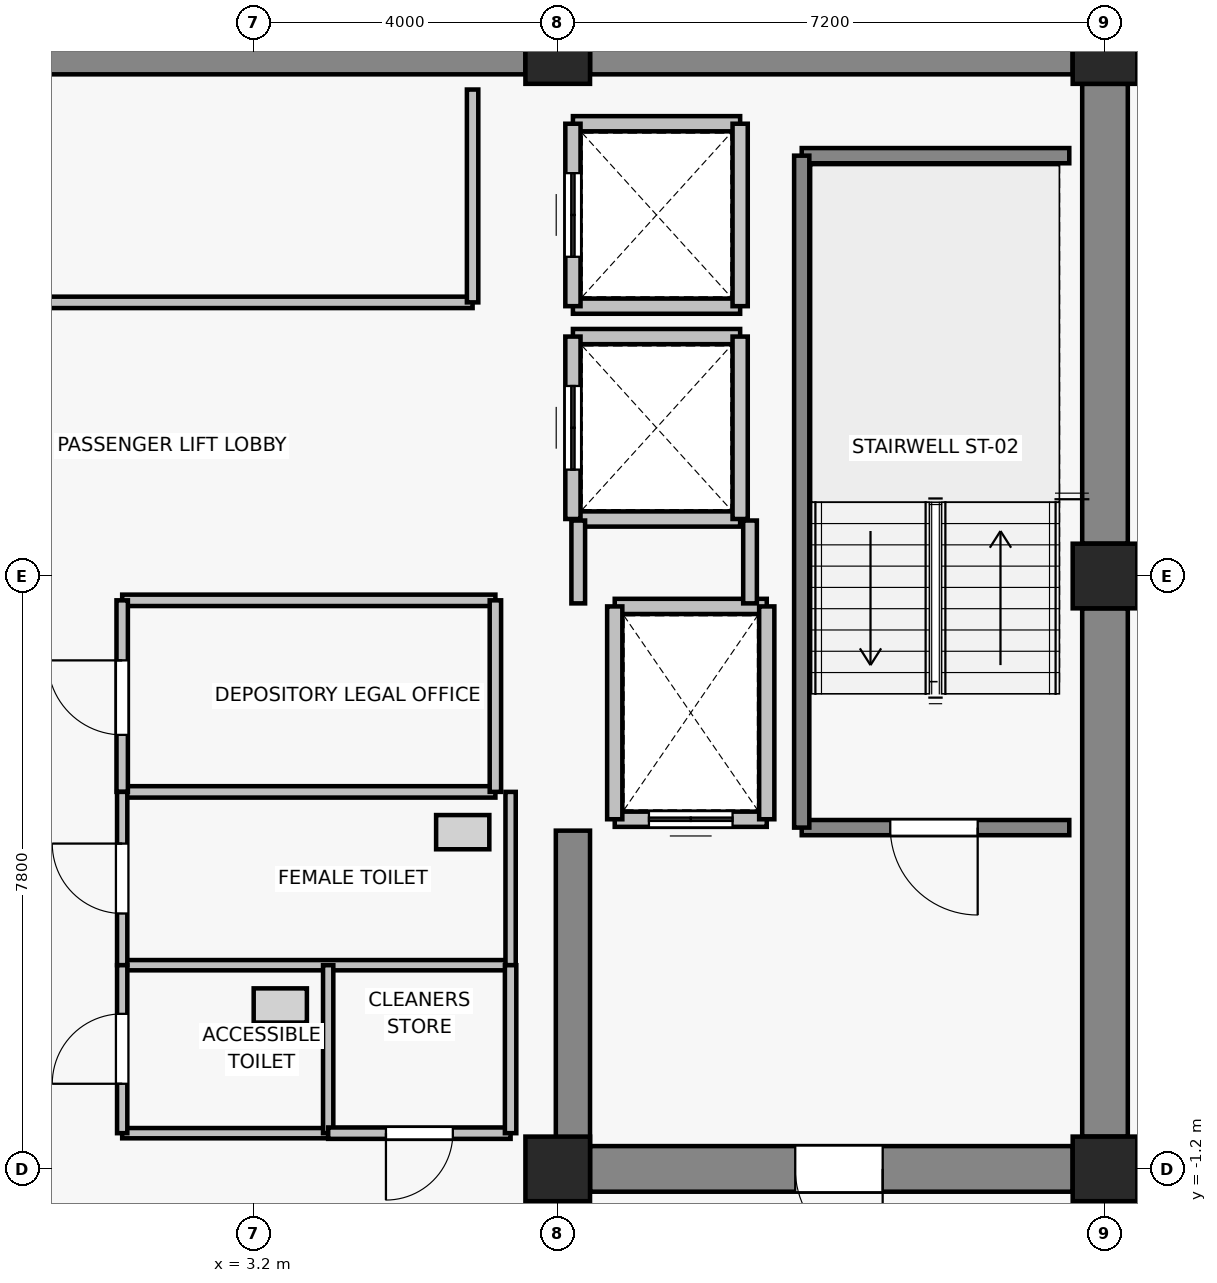
"""IFC4 building model, lengths in metres.
Left out: names, types, materials, properties, quantities, classifications, styles, units other than length and angle.
Written with IfcOpenShell. Run it as: python <this file> out.ifc"""

import sys

from ifc_helpers import new_model, si_unit, direction, frame, frame_2d, origin, origin_2d, place, context, subcontext, project, spatial, rectangle, extrude, source, transform, mapped, element, fill, save


model = new_model("IFC4")
c1 = context("Model", 3, precision=1e-05, world=origin(), true_north=direction((0.0, 1.0)))
c2 = subcontext(c1, "Body", "Model", "MODEL_VIEW")
j1 = project(units=[si_unit("LENGTHUNIT", "METRE"), si_unit("PLANEANGLEUNIT", "RADIAN")], contexts=[c1])
p1 = place(None, origin())
s1 = spatial("IfcSite", under=j1, at=p1, CompositionType="ELEMENT")
p2 = place(p1, origin())
s2 = spatial("IfcBuilding", under=s1, at=p2, CompositionType="ELEMENT")
p3 = place(p2, frame((0.0, 0.0, 268.3)))
s3 = spatial("IfcBuildingStorey", under=s2, at=p3, CompositionType="ELEMENT", Elevation=268.3)
for number, where, z_axis, x_axis in (
    (1, (7.2, -1.2, 0.0), (0.0, 0.0, 1.0), (1.0, 0.0, 0.0)),
    (2, (14.4, -1.2, 0.0), (0.0, 0.0, 1.0), (1.0, 0.0, 0.0)),
    (3, (14.4, 6.6, 0.0), (0.0, 0.0, 1.0), (1.0, 0.0, 0.0)),
    (4, (7.2, 13.5, 0.0), (0.0, 0.0, 1.0), (1.0, 0.0, 0.0)),
    (5, (14.4, 13.5, 0.0), (0.0, 0.0, 1.0), (1.0, 0.0, 0.0)),
):
    element("IfcColumn", number, at=place(p3, frame(where, z_axis=z_axis, x_axis=x_axis)), inside=s3, PredefinedType="COLUMN", context=c2, shape_type="SweptSolid", body=[
        extrude(rectangle(XDim=0.85, YDim=0.85, at=origin_2d()), origin(), (0.0, 0.0, 1.0), 3.3),
    ])
p4 = place(p3, frame((-6.775, 13.5, 0.0), z_axis=(0.0, 0.0, 1.0), x_axis=(1.0, 0.0, 0.0)))
e6 = element("IfcWall", 6, at=p4, inside=s3, PredefinedType="SHEAR", context=c2, shape_type="SweptSolid", body=[
    extrude(rectangle(XDim=13.55, YDim=0.6, at=frame_2d((6.775, 0.0))), origin(), (0.0, 0.0, 1.0), 3.08),
])
p5 = place(p3, frame((7.625, 13.5, 0.0), z_axis=(0.0, 0.0, 1.0), x_axis=(1.0, 0.0, 0.0)))
e7 = element("IfcWall", 7, at=p5, inside=s3, PredefinedType="SHEAR", context=c2, shape_type="SweptSolid", body=[
    extrude(rectangle(XDim=6.35, YDim=0.6, at=frame_2d((3.175, 0.0))), origin(), (0.0, 0.0, 1.0), 3.08),
])
p6 = place(p3, frame((14.4, -0.775, 0.0), z_axis=(0.0, 0.0, 1.0), x_axis=(0.0, 1.0, 0.0)))
e8 = element("IfcWall", 8, at=p6, inside=s3, PredefinedType="SHEAR", context=c2, shape_type="SweptSolid", body=[
    extrude(rectangle(XDim=6.95, YDim=0.6, at=frame_2d((3.475, 0.0))), origin(), (0.0, 0.0, 1.0), 3.08),
])
p7 = place(p3, frame((14.4, 7.025, 0.0), z_axis=(0.0, 0.0, 1.0), x_axis=(0.0, 1.0, 0.0)))
e9 = element("IfcWall", 9, at=p7, inside=s3, PredefinedType="SHEAR", context=c2, shape_type="SweptSolid", body=[
    extrude(rectangle(XDim=6.05, YDim=0.6, at=frame_2d((3.025, 0.0))), origin(), (0.0, 0.0, 1.0), 3.08),
])
p8 = place(p3, frame((13.975, -1.2, 0.0), z_axis=(0.0, 0.0, 1.0), x_axis=(-1.0, 0.0, 0.0)))
e10 = element("IfcWall", 10, at=p8, inside=s3, PredefinedType="SHEAR", context=c2, shape_type="SweptSolid", body=[
    extrude(rectangle(XDim=6.35, YDim=0.6, at=frame_2d((3.175, 0.0))), origin(), (0.0, 0.0, 1.0), 3.08),
])
p9 = place(p8, frame((2.5, 0.0, 0.0)))
e11 = element("IfcOpeningElement", 11, at=p9, cuts=e10, PredefinedType="OPENING", context=c2, shape_type="SweptSolid", body=[
    extrude(rectangle(XDim=1.15, YDim=2.15, at=frame_2d((0.575, 1.075))), frame((0.0, 0.31, 0.0), z_axis=(0.0, -1.0, 0.0), x_axis=(1.0, 0.0, 0.0)), (0.0, 0.0, 1.0), 0.62),
])
p10 = place(p3, frame((7.4, -0.9, 0.0), z_axis=(0.0, 0.0, 1.0), x_axis=(0.0, 1.0, 0.0)))
e12 = element("IfcWall", 12, at=p10, inside=s3, PredefinedType="SHEAR", context=c2, shape_type="SweptSolid", body=[
    extrude(rectangle(XDim=4.15, YDim=0.45, at=frame_2d((2.075, 0.0))), origin(), (0.0, 0.0, 1.0), 3.08),
])
p11 = place(p3, frame((9.95, 3.4, 0.0), z_axis=(0.0, 0.0, 1.0), x_axis=(-1.0, 0.0, 0.0)))
e13 = element("IfcWall", 13, at=p11, inside=s3, PredefinedType="SOLIDWALL", context=c2, shape_type="SweptSolid", body=[
    extrude(rectangle(XDim=2.0, YDim=0.2, at=frame_2d((1.0, 0.0))), origin(), (0.0, 0.0, 1.0), 3.08),
])
p12 = place(p11, frame((0.45, 0.0, 0.0)))
e14 = element("IfcOpeningElement", 14, at=p12, cuts=e13, PredefinedType="OPENING", context=c2, shape_type="SweptSolid", body=[
    extrude(rectangle(XDim=1.1, YDim=2.2, at=frame_2d((0.55, 1.1))), frame((0.0, 0.11, 0.0), z_axis=(0.0, -1.0, 0.0), x_axis=(1.0, 0.0, 0.0)), (0.0, 0.0, 1.0), 0.22),
])
p13 = place(p3, frame((7.95, 6.2, 0.0), z_axis=(0.0, 0.0, 1.0), x_axis=(1.0, 0.0, 0.0)))
e15 = element("IfcWall", 15, at=p13, inside=s3, PredefinedType="SOLIDWALL", context=c2, shape_type="SweptSolid", body=[
    extrude(rectangle(XDim=2.0, YDim=0.2, at=frame_2d((1.0, 0.0))), origin(), (0.0, 0.0, 1.0), 3.08),
])
for number, where, z_axis, x_axis in (
    (16, (7.95, 3.4, 0.0), (0.0, 0.0, 1.0), (0.0, 1.0, 0.0)),
    (17, (9.95, 6.2, 0.0), (0.0, 0.0, 1.0), (0.0, -1.0, 0.0)),
):
    element("IfcWall", number, at=place(p3, frame(where, z_axis=z_axis, x_axis=x_axis)), inside=s3, PredefinedType="SOLIDWALL", context=c2, shape_type="SweptSolid", body=[
        extrude(rectangle(XDim=2.8, YDim=0.2, at=frame_2d((1.4, 0.0))), origin(), (0.0, 0.0, 1.0), 3.08),
    ])
for number, where, z_axis, x_axis in (
    (18, (9.6, 7.35, 0.0), (0.0, 0.0, 1.0), (-1.0, 0.0, 0.0)),
    (19, (7.4, 9.75, 0.0), (0.0, 0.0, 1.0), (1.0, 0.0, 0.0)),
):
    element("IfcWall", number, at=place(p3, frame(where, z_axis=z_axis, x_axis=x_axis)), inside=s3, PredefinedType="SOLIDWALL", context=c2, shape_type="SweptSolid", body=[
        extrude(rectangle(XDim=2.2, YDim=0.2, at=frame_2d((1.1, 0.0))), origin(), (0.0, 0.0, 1.0), 2.47),
    ])
p14 = place(p3, frame((7.4, 7.35, 0.0), z_axis=(0.0, 0.0, 1.0), x_axis=(0.0, 1.0, 0.0)))
e20 = element("IfcWall", 20, at=p14, inside=s3, PredefinedType="SOLIDWALL", context=c2, shape_type="SweptSolid", body=[
    extrude(rectangle(XDim=2.4, YDim=0.2, at=frame_2d((1.2, 0.0))), origin(), (0.0, 0.0, 1.0), 2.47),
])
p15 = place(p14, frame((0.65, 0.0, 0.0)))
e21 = element("IfcOpeningElement", 21, at=p15, cuts=e20, PredefinedType="OPENING", context=c2, shape_type="SweptSolid", body=[
    extrude(rectangle(XDim=1.1, YDim=2.2, at=frame_2d((0.55, 1.1))), frame((0.0, 0.11, 0.0), z_axis=(0.0, -1.0, 0.0), x_axis=(1.0, 0.0, 0.0)), (0.0, 0.0, 1.0), 0.22),
])
p16 = place(p3, frame((9.6, 9.75, 0.0), z_axis=(0.0, 0.0, 1.0), x_axis=(0.0, -1.0, 0.0)))
e22 = element("IfcWall", 22, at=p16, inside=s3, PredefinedType="SOLIDWALL", context=c2, shape_type="SweptSolid", body=[
    extrude(rectangle(XDim=2.4, YDim=0.2, at=frame_2d((1.2, 0.0))), origin(), (0.0, 0.0, 1.0), 3.08),
])
for number, where, z_axis, x_axis in (
    (23, (9.6, 10.15, 0.0), (0.0, 0.0, 1.0), (-1.0, 0.0, 0.0)),
    (24, (7.4, 12.55, 0.0), (0.0, 0.0, 1.0), (1.0, 0.0, 0.0)),
):
    element("IfcWall", number, at=place(p3, frame(where, z_axis=z_axis, x_axis=x_axis)), inside=s3, PredefinedType="SOLIDWALL", context=c2, shape_type="SweptSolid", body=[
        extrude(rectangle(XDim=2.2, YDim=0.2, at=frame_2d((1.1, 0.0))), origin(), (0.0, 0.0, 1.0), 2.47),
    ])
p17 = place(p3, frame((7.4, 10.15, 0.0), z_axis=(0.0, 0.0, 1.0), x_axis=(0.0, 1.0, 0.0)))
e25 = element("IfcWall", 25, at=p17, inside=s3, PredefinedType="SOLIDWALL", context=c2, shape_type="SweptSolid", body=[
    extrude(rectangle(XDim=2.4, YDim=0.2, at=frame_2d((1.2, 0.0))), origin(), (0.0, 0.0, 1.0), 2.47),
])
p18 = place(p17, frame((0.65, 0.0, 0.0)))
e26 = element("IfcOpeningElement", 26, at=p18, cuts=e25, PredefinedType="OPENING", context=c2, shape_type="SweptSolid", body=[
    extrude(rectangle(XDim=1.1, YDim=2.2, at=frame_2d((0.55, 1.1))), frame((0.0, 0.11, 0.0), z_axis=(0.0, -1.0, 0.0), x_axis=(1.0, 0.0, 0.0)), (0.0, 0.0, 1.0), 0.22),
])
p19 = place(p3, frame((9.6, 12.55, 0.0), z_axis=(0.0, 0.0, 1.0), x_axis=(0.0, -1.0, 0.0)))
e27 = element("IfcWall", 27, at=p19, inside=s3, PredefinedType="SOLIDWALL", context=c2, shape_type="SweptSolid", body=[
    extrude(rectangle(XDim=2.4, YDim=0.2, at=frame_2d((1.2, 0.0))), origin(), (0.0, 0.0, 1.0), 3.08),
])
p20 = place(p3, frame((13.93, 3.29, 0.0), z_axis=(0.0, 0.0, 1.0), x_axis=(-1.0, 0.0, 0.0)))
e28 = element("IfcWall", 28, at=p20, inside=s3, PredefinedType="SOLIDWALL", context=c2, shape_type="SweptSolid", body=[
    extrude(rectangle(XDim=3.52, YDim=0.2, at=frame_2d((1.76, 0.0))), origin(), (0.0, 0.0, 1.0), 3.08),
])
p21 = place(p20, frame((1.205, 0.0, 0.0)))
e29 = element("IfcOpeningElement", 29, at=p21, cuts=e28, PredefinedType="OPENING", context=c2, shape_type="SweptSolid", body=[
    extrude(rectangle(XDim=1.15, YDim=2.15, at=frame_2d((0.575, 1.075))), frame((0.0, 0.11, 0.0), z_axis=(0.0, -1.0, 0.0), x_axis=(1.0, 0.0, 0.0)), (0.0, 0.0, 1.0), 0.22),
])
p22 = place(p3, frame((10.41, 12.13, 0.0), z_axis=(0.0, 0.0, 1.0), x_axis=(1.0, 0.0, 0.0)))
e30 = element("IfcWall", 30, at=p22, inside=s3, PredefinedType="SOLIDWALL", context=c2, shape_type="SweptSolid", body=[
    extrude(rectangle(XDim=3.52, YDim=0.2, at=frame_2d((1.76, 0.0))), origin(), (0.0, 0.0, 1.0), 3.08),
])
p23 = place(p3, frame((10.41, 3.29, 0.0), z_axis=(0.0, 0.0, 1.0), x_axis=(0.0, 1.0, 0.0)))
e31 = element("IfcWall", 31, at=p23, inside=s3, PredefinedType="SOLIDWALL", context=c2, shape_type="SweptSolid", body=[
    extrude(rectangle(XDim=8.84, YDim=0.2, at=frame_2d((4.42, 0.0))), origin(), (0.0, 0.0, 1.0), 3.08),
])
p24 = place(p3, frame((7.47, 6.24, 0.0), z_axis=(0.0, 0.0, 1.0), x_axis=(0.0, 1.0, 0.0)))
e32 = element("IfcWall", 32, at=p24, inside=s3, PredefinedType="PARTITIONING", context=c2, shape_type="SweptSolid", body=[
    extrude(rectangle(XDim=1.09, YDim=0.18, at=frame_2d((0.545, 0.0))), origin(), (0.0, 0.0, 1.0), 2.47),
])
p25 = place(p3, frame((9.73, 7.33, 0.0), z_axis=(0.0, 0.0, 1.0), x_axis=(0.0, -1.0, 0.0)))
e33 = element("IfcWall", 33, at=p25, inside=s3, PredefinedType="PARTITIONING", context=c2, shape_type="SweptSolid", body=[
    extrude(rectangle(XDim=1.09, YDim=0.18, at=frame_2d((0.545, 0.0))), origin(), (0.0, 0.0, 1.0), 3.08),
])
p26 = place(p3, frame((6.08, 10.2, 0.0), z_axis=(0.0, 0.0, 1.0), x_axis=(-1.0, 0.0, 0.0)))
e34 = element("IfcWall", 34, at=p26, inside=s3, PredefinedType="PARTITIONING", context=c2, shape_type="SweptSolid", body=[
    extrude(rectangle(XDim=12.16, YDim=0.15, at=frame_2d((6.08, 0.0))), origin(), (0.0, 0.0, 1.0), 3.08),
])
p27 = place(p26, frame((7.005, 0.0, 0.0)))
e35 = element("IfcOpeningElement", 35, at=p27, cuts=e34, PredefinedType="OPENING", context=c2, shape_type="SweptSolid", body=[
    extrude(rectangle(XDim=1.15, YDim=2.15, at=frame_2d((0.575, 1.075))), frame((0.0, 0.085, 0.0), z_axis=(0.0, -1.0, 0.0), x_axis=(1.0, 0.0, 0.0)), (0.0, 0.0, 1.0), 0.17),
])
p28 = place(p3, frame((6.08, 13.0, 0.0), z_axis=(0.0, 0.0, 1.0), x_axis=(0.0, -1.0, 0.0)))
e36 = element("IfcWall", 36, at=p28, inside=s3, PredefinedType="PARTITIONING", context=c2, shape_type="SweptSolid", body=[
    extrude(rectangle(XDim=2.8, YDim=0.15, at=frame_2d((1.4, 0.0))), origin(), (0.0, 0.0, 1.0), 3.08),
])
for number, where, z_axis, x_axis in (
    (37, (6.38, 3.76, 0.0), (0.0, 0.0, 1.0), (-1.0, 0.0, 0.0)),
    (38, (1.47, 6.28, 0.0), (0.0, 0.0, 1.0), (1.0, 0.0, 0.0)),
):
    element("IfcWall", number, at=place(p3, frame(where, z_axis=z_axis, x_axis=x_axis)), inside=s3, PredefinedType="PARTITIONING", context=c2, shape_type="SweptSolid", body=[
        extrude(rectangle(XDim=4.91, YDim=0.15, at=frame_2d((2.455, 0.0))), origin(), (0.0, 0.0, 1.0), 3.08),
    ])
p29 = place(p3, frame((1.47, 3.76, 0.0), z_axis=(0.0, 0.0, 1.0), x_axis=(0.0, 1.0, 0.0)))
e39 = element("IfcWall", 39, at=p29, inside=s3, PredefinedType="PARTITIONING", context=c2, shape_type="SweptSolid", body=[
    extrude(rectangle(XDim=2.52, YDim=0.15, at=frame_2d((1.26, 0.0))), origin(), (0.0, 0.0, 1.0), 3.08),
])
p30 = place(p29, frame((0.75, 0.0, 0.0)))
e40 = element("IfcOpeningElement", 40, at=p30, cuts=e39, PredefinedType="OPENING", context=c2, shape_type="SweptSolid", body=[
    extrude(rectangle(XDim=0.98, YDim=2.15, at=frame_2d((0.49, 1.075))), frame((0.0, 0.085, 0.0), z_axis=(0.0, -1.0, 0.0), x_axis=(1.0, 0.0, 0.0)), (0.0, 0.0, 1.0), 0.17),
])
p31 = place(p3, frame((6.38, 6.28, 0.0), z_axis=(0.0, 0.0, 1.0), x_axis=(0.0, -1.0, 0.0)))
e41 = element("IfcWall", 41, at=p31, inside=s3, PredefinedType="PARTITIONING", context=c2, shape_type="SweptSolid", body=[
    extrude(rectangle(XDim=2.52, YDim=0.15, at=frame_2d((1.26, 0.0))), origin(), (0.0, 0.0, 1.0), 3.08),
])
p32 = place(p3, frame((6.58, 1.48, 0.0), z_axis=(0.0, 0.0, 1.0), x_axis=(-1.0, 0.0, 0.0)))
e42 = element("IfcWall", 42, at=p32, inside=s3, PredefinedType="PARTITIONING", context=c2, shape_type="SweptSolid", body=[
    extrude(rectangle(XDim=5.11, YDim=0.135, at=frame_2d((2.555, 0.0))), origin(), (0.0, 0.0, 1.0), 3.08),
])
p33 = place(p3, frame((1.47, 1.48, 0.0), z_axis=(0.0, 0.0, 1.0), x_axis=(0.0, 1.0, 0.0)))
e43 = element("IfcWall", 43, at=p33, inside=s3, PredefinedType="PARTITIONING", context=c2, shape_type="SweptSolid", body=[
    extrude(rectangle(XDim=2.28, YDim=0.135, at=frame_2d((1.14, 0.0))), origin(), (0.0, 0.0, 1.0), 3.08),
])
p34 = place(p33, frame((0.68, 0.0, 0.0)))
e44 = element("IfcOpeningElement", 44, at=p34, cuts=e43, PredefinedType="OPENING", context=c2, shape_type="SweptSolid", body=[
    extrude(rectangle(XDim=0.92, YDim=2.1, at=frame_2d((0.46, 1.05))), frame((0.0, 0.077, 0.0), z_axis=(0.0, -1.0, 0.0), x_axis=(1.0, 0.0, 0.0)), (0.0, 0.0, 1.0), 0.155),
])
p35 = place(p3, frame((6.58, 3.76, 0.0), z_axis=(0.0, 0.0, 1.0), x_axis=(0.0, -1.0, 0.0)))
e45 = element("IfcWall", 45, at=p35, inside=s3, PredefinedType="PARTITIONING", context=c2, shape_type="SweptSolid", body=[
    extrude(rectangle(XDim=2.28, YDim=0.135, at=frame_2d((1.14, 0.0))), origin(), (0.0, 0.0, 1.0), 3.08),
])
p36 = place(p3, frame((4.18, -0.73, 0.0), z_axis=(0.0, 0.0, 1.0), x_axis=(-1.0, 0.0, 0.0)))
e46 = element("IfcWall", 46, at=p36, inside=s3, PredefinedType="PARTITIONING", context=c2, shape_type="SweptSolid", body=[
    extrude(rectangle(XDim=2.71, YDim=0.135, at=frame_2d((1.355, 0.0))), origin(), (0.0, 0.0, 1.0), 3.08),
])
p37 = place(p3, frame((1.47, -0.73, 0.0), z_axis=(0.0, 0.0, 1.0), x_axis=(0.0, 1.0, 0.0)))
e47 = element("IfcWall", 47, at=p37, inside=s3, PredefinedType="PARTITIONING", context=c2, shape_type="SweptSolid", body=[
    extrude(rectangle(XDim=2.21, YDim=0.135, at=frame_2d((1.105, 0.0))), origin(), (0.0, 0.0, 1.0), 3.08),
])
p38 = place(p37, frame((0.65, 0.0, 0.0)))
e48 = element("IfcOpeningElement", 48, at=p38, cuts=e47, PredefinedType="OPENING", context=c2, shape_type="SweptSolid", body=[
    extrude(rectangle(XDim=0.92, YDim=2.1, at=frame_2d((0.46, 1.05))), frame((0.0, 0.077, 0.0), z_axis=(0.0, -1.0, 0.0), x_axis=(1.0, 0.0, 0.0)), (0.0, 0.0, 1.0), 0.155),
])
p39 = place(p3, frame((4.18, 1.48, 0.0), z_axis=(0.0, 0.0, 1.0), x_axis=(0.0, -1.0, 0.0)))
e49 = element("IfcWall", 49, at=p39, inside=s3, PredefinedType="PARTITIONING", context=c2, shape_type="SweptSolid", body=[
    extrude(rectangle(XDim=2.21, YDim=0.135, at=frame_2d((1.105, 0.0))), origin(), (0.0, 0.0, 1.0), 3.08),
])
p40 = place(p3, frame((6.58, -0.73, 0.0), z_axis=(0.0, 0.0, 1.0), x_axis=(-1.0, 0.0, 0.0)))
e50 = element("IfcWall", 50, at=p40, inside=s3, PredefinedType="PARTITIONING", context=c2, shape_type="SweptSolid", body=[
    extrude(rectangle(XDim=2.4, YDim=0.15, at=frame_2d((1.2, 0.0))), origin(), (0.0, 0.0, 1.0), 3.08),
])
p41 = place(p40, frame((0.76, 0.0, 0.0)))
e51 = element("IfcOpeningElement", 51, at=p41, cuts=e50, PredefinedType="OPENING", context=c2, shape_type="SweptSolid", body=[
    extrude(rectangle(XDim=0.88, YDim=2.1, at=frame_2d((0.44, 1.05))), frame((0.0, 0.085, 0.0), z_axis=(0.0, -1.0, 0.0), x_axis=(1.0, 0.0, 0.0)), (0.0, 0.0, 1.0), 0.17),
])
p42 = place(p3, frame((6.58, 1.48, 0.0), z_axis=(0.0, 0.0, 1.0), x_axis=(0.0, -1.0, 0.0)))
e52 = element("IfcWall", 52, at=p42, inside=s3, PredefinedType="PARTITIONING", context=c2, shape_type="SweptSolid", body=[
    extrude(rectangle(XDim=2.21, YDim=0.15, at=frame_2d((1.105, 0.0))), origin(), (0.0, 0.0, 1.0), 3.08),
])
m1 = source(origin(), c2, "Body", "SweptSolid", [
    extrude(rectangle(XDim=1.1, YDim=2.2, at=frame_2d((0.55, 1.1))), frame((0.0, 0.025, 0.0), z_axis=(0.0, -1.0, 0.0), x_axis=(1.0, 0.0, 0.0)), (0.0, 0.0, 1.0), 0.05),
])
p43 = place(p12, origin())
e53 = element("IfcDoor", 53, at=p43, inside=s3, OperationType="DOUBLE_DOOR_SLIDING", PredefinedType="DOOR", context=c2, shape_type="MappedRepresentation", body=[
    mapped(m1, transform((0.0, 0.0, 0.0), x_axis=(1.0, 0.0, 0.0), y_axis=(0.0, 1.0, 0.0), z_axis=(0.0, 0.0, 1.0), scale=1.0)),
])
fill(e14, e53)
p44 = place(p15, origin())
e54 = element("IfcDoor", 54, at=p44, inside=s3, OperationType="DOUBLE_DOOR_SLIDING", PredefinedType="DOOR", context=c2, shape_type="MappedRepresentation", body=[
    mapped(m1, transform((0.0, 0.0, 0.0), x_axis=(1.0, 0.0, 0.0), y_axis=(0.0, 1.0, 0.0), z_axis=(0.0, 0.0, 1.0), scale=1.0)),
])
fill(e21, e54)
p45 = place(p18, origin())
e55 = element("IfcDoor", 55, at=p45, inside=s3, OperationType="DOUBLE_DOOR_SLIDING", PredefinedType="DOOR", context=c2, shape_type="MappedRepresentation", body=[
    mapped(m1, transform((0.0, 0.0, 0.0), x_axis=(1.0, 0.0, 0.0), y_axis=(0.0, 1.0, 0.0), z_axis=(0.0, 0.0, 1.0), scale=1.0)),
])
fill(e26, e55)
m2 = source(origin(), c2, "Body", "SweptSolid", [
    extrude(rectangle(XDim=1.15, YDim=2.15, at=frame_2d((0.575, 1.075))), frame((0.0, 0.025, 0.0), z_axis=(0.0, -1.0, 0.0), x_axis=(1.0, 0.0, 0.0)), (0.0, 0.0, 1.0), 0.05),
])
p46 = place(p21, origin())
e56 = element("IfcDoor", 56, at=p46, inside=s3, OperationType="SINGLE_SWING_LEFT", PredefinedType="DOOR", context=c2, shape_type="MappedRepresentation", body=[
    mapped(m2, transform((0.0, 0.0, 0.0), x_axis=(1.0, 0.0, 0.0), y_axis=(0.0, 1.0, 0.0), z_axis=(0.0, 0.0, 1.0), scale=1.0)),
])
fill(e29, e56)
p47 = place(p9, origin())
e57 = element("IfcDoor", 57, at=p47, inside=s3, OperationType="SINGLE_SWING_LEFT", PredefinedType="DOOR", context=c2, shape_type="MappedRepresentation", body=[
    mapped(m2, transform((0.0, 0.0, 0.0), x_axis=(1.0, 0.0, 0.0), y_axis=(0.0, 1.0, 0.0), z_axis=(0.0, 0.0, 1.0), scale=1.0)),
])
fill(e11, e57)
m3 = source(origin(), c2, "Body", "SweptSolid", [
    extrude(rectangle(XDim=0.98, YDim=2.15, at=frame_2d((0.49, 1.075))), frame((0.0, 0.025, 0.0), z_axis=(0.0, -1.0, 0.0), x_axis=(1.0, 0.0, 0.0)), (0.0, 0.0, 1.0), 0.05),
])
p48 = place(p30, origin())
e58 = element("IfcDoor", 58, at=p48, inside=s3, OperationType="SINGLE_SWING_RIGHT", PredefinedType="DOOR", context=c2, shape_type="MappedRepresentation", body=[
    mapped(m3, transform((0.0, 0.0, 0.0), x_axis=(1.0, 0.0, 0.0), y_axis=(0.0, 1.0, 0.0), z_axis=(0.0, 0.0, 1.0), scale=1.0)),
])
fill(e40, e58)
m4 = source(origin(), c2, "Body", "SweptSolid", [
    extrude(rectangle(XDim=0.92, YDim=2.1, at=frame_2d((0.46, 1.05))), frame((0.0, 0.025, 0.0), z_axis=(0.0, -1.0, 0.0), x_axis=(1.0, 0.0, 0.0)), (0.0, 0.0, 1.0), 0.05),
])
p49 = place(p34, origin())
e59 = element("IfcDoor", 59, at=p49, inside=s3, OperationType="SINGLE_SWING_RIGHT", PredefinedType="DOOR", context=c2, shape_type="MappedRepresentation", body=[
    mapped(m4, transform((0.0, 0.0, 0.0), x_axis=(1.0, 0.0, 0.0), y_axis=(0.0, 1.0, 0.0), z_axis=(0.0, 0.0, 1.0), scale=1.0)),
])
fill(e44, e59)
p50 = place(p38, origin())
e60 = element("IfcDoor", 60, at=p50, inside=s3, OperationType="SINGLE_SWING_LEFT", PredefinedType="DOOR", context=c2, shape_type="MappedRepresentation", body=[
    mapped(m4, transform((0.0, 0.0, 0.0), x_axis=(1.0, 0.0, 0.0), y_axis=(0.0, 1.0, 0.0), z_axis=(0.0, 0.0, 1.0), scale=1.0)),
])
fill(e48, e60)
m5 = source(origin(), c2, "Body", "SweptSolid", [
    extrude(rectangle(XDim=0.88, YDim=2.1, at=frame_2d((0.44, 1.05))), frame((0.0, 0.025, 0.0), z_axis=(0.0, -1.0, 0.0), x_axis=(1.0, 0.0, 0.0)), (0.0, 0.0, 1.0), 0.05),
])
p51 = place(p41, origin())
e61 = element("IfcDoor", 61, at=p51, inside=s3, OperationType="SINGLE_SWING_RIGHT", PredefinedType="DOOR", context=c2, shape_type="MappedRepresentation", body=[
    mapped(m5, transform((0.0, 0.0, 0.0), x_axis=(1.0, 0.0, 0.0), y_axis=(0.0, 1.0, 0.0), z_axis=(0.0, 0.0, 1.0), scale=1.0)),
])
fill(e51, e61)
save(model, sys.argv[1])
